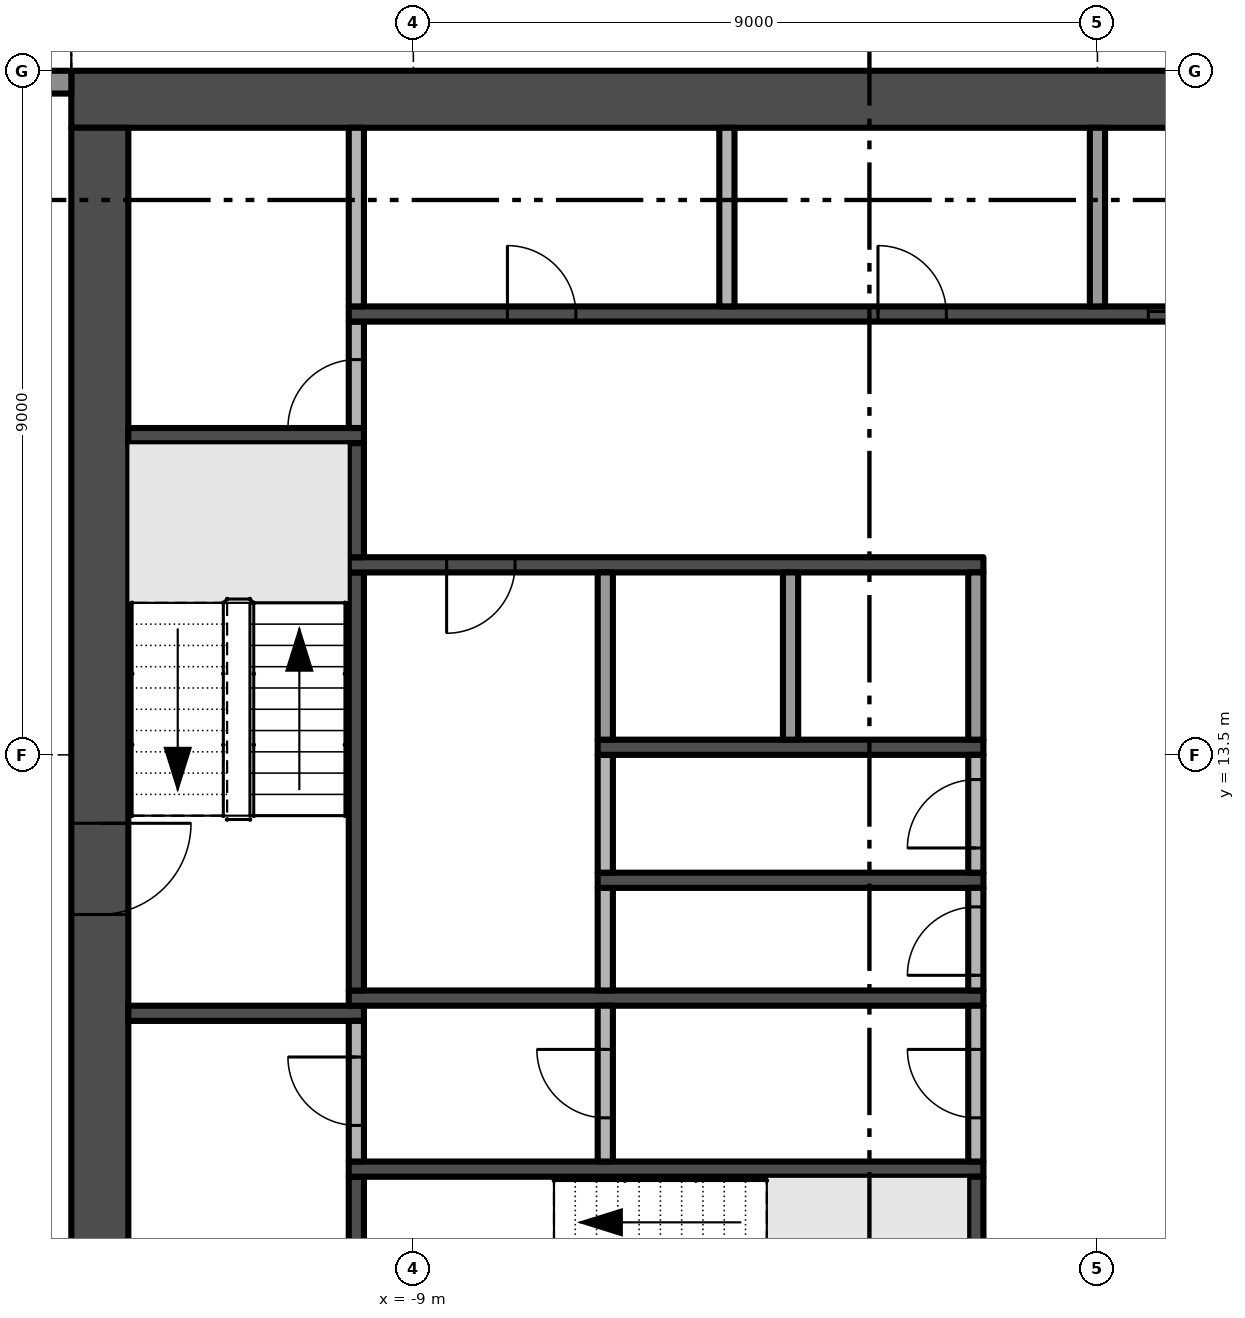
"""IFC4 building model, lengths in metres.
Left out: names, types, materials, properties, quantities, classifications, styles, units other than length and angle.
Written with IfcOpenShell. Run it as: python <this file> out.ifc"""

import sys

from ifc_helpers import new_model, si_unit, direction, frame, frame_2d, origin, place, context, subcontext, project, spatial, rectangle, extrude, element, fill, save


model = new_model("IFC4")
c1 = context("Model", 3, precision=1e-05, world=origin(), true_north=direction((0.0, 1.0)))
c2 = subcontext(c1, "Body", "Model", "MODEL_VIEW")
j1 = project(units=[si_unit("LENGTHUNIT", "METRE"), si_unit("PLANEANGLEUNIT", "RADIAN")], contexts=[c1])
p1 = place(None, origin())
s1 = spatial("IfcSite", under=j1, at=p1, CompositionType="ELEMENT")
p2 = place(p1, origin())
s2 = spatial("IfcBuilding", under=s1, at=p2, CompositionType="ELEMENT")
p3 = place(p2, frame((0.0, 0.0, 170.6)))
s3 = spatial("IfcBuildingStorey", under=s2, at=p3, CompositionType="ELEMENT", Elevation=170.6)
p4 = place(p3, frame((13.5, 22.125, -0.3), z_axis=(0.0, 0.0, 1.0), x_axis=(-1.0, 0.0, 0.0)))
e1 = element("IfcWall", 1, at=p4, inside=s3, PredefinedType="SHEAR", context=c2, shape_type="SweptSolid", body=[
    extrude(rectangle(XDim=27.0, YDim=0.75, at=frame_2d((13.5, 0.0))), origin(), (0.0, 0.0, 1.0), 3.8),
])
p5 = place(p3, frame((-13.125, 21.75, -0.3), z_axis=(0.0, 0.0, 1.0), x_axis=(0.0, -1.0, 0.0)))
e2 = element("IfcWall", 2, at=p5, inside=s3, PredefinedType="SHEAR", context=c2, shape_type="SweptSolid", body=[
    extrude(rectangle(XDim=16.5, YDim=0.75, at=frame_2d((8.25, 0.0))), origin(), (0.0, 0.0, 1.0), 3.8),
])
p6 = place(p5, frame((9.15, 0.0, 0.3)))
e3 = element("IfcOpeningElement", 3, at=p6, cuts=e2, PredefinedType="OPENING", context=c2, shape_type="SweptSolid", body=[
    extrude(rectangle(XDim=1.2, YDim=2.2, at=frame_2d((0.6, 1.1))), frame((0.0, 0.385, 0.0), z_axis=(0.0, -1.0, 0.0), x_axis=(1.0, 0.0, 0.0)), (0.0, 0.0, 1.0), 0.77),
])
p7 = place(p3, frame((-16.9, 22.35, 0.0), z_axis=(0.0, 0.0, 1.0), x_axis=(1.0, 0.0, 0.0)))
e4 = element("IfcWall", 4, at=p7, inside=s3, PredefinedType="SOLIDWALL", context=c2, shape_type="SweptSolid", body=[
    extrude(rectangle(XDim=3.4, YDim=0.3, at=frame_2d((1.7, 0.0))), origin(), (0.0, 0.0, 1.0), 3.5),
])
p8 = place(p7, frame((0.3, 0.0, 0.0)))
e5 = element("IfcOpeningElement", 5, at=p8, cuts=e4, PredefinedType="OPENING", context=c2, shape_type="SweptSolid", body=[
    extrude(rectangle(XDim=2.4, YDim=2.4, at=frame_2d((1.2, 1.2))), frame((0.0, 0.16, 0.0), z_axis=(0.0, -1.0, 0.0), x_axis=(1.0, 0.0, 0.0)), (0.0, 0.0, 1.0), 0.32),
])
for number, where, z_axis, x_axis in (
    (6, (-12.75, 10.1, 0.0), (0.0, 0.0, 1.0), (1.0, 0.0, 0.0)),
    (7, (-12.75, 17.7, 0.0), (0.0, 0.0, 1.0), (1.0, 0.0, 0.0)),
):
    element("IfcWall", number, at=place(p3, frame(where, z_axis=z_axis, x_axis=x_axis)), inside=s3, PredefinedType="SHEAR", context=c2, shape_type="SweptSolid", body=[
        extrude(rectangle(XDim=3.1, YDim=0.2, at=frame_2d((1.55, 0.0))), origin(), (0.0, 0.0, 1.0), 3.5),
    ])
p9 = place(p3, frame((-9.75, 5.25, 0.0), z_axis=(0.0, 0.0, 1.0), x_axis=(0.0, 1.0, 0.0)))
e8 = element("IfcWall", 8, at=p9, inside=s3, PredefinedType="SHEAR", context=c2, shape_type="SweptSolid", body=[
    extrude(rectangle(XDim=2.7, YDim=0.2, at=frame_2d((1.35, 0.0))), origin(), (0.0, 0.0, 1.0), 3.5),
])
p10 = place(p3, frame((-9.85, 8.05, 0.0), z_axis=(0.0, 0.0, 1.0), x_axis=(1.0, 0.0, 0.0)))
e9 = element("IfcWall", 9, at=p10, inside=s3, PredefinedType="SHEAR", context=c2, shape_type="SweptSolid", body=[
    extrude(rectangle(XDim=8.35, YDim=0.2, at=frame_2d((4.175, 0.0))), origin(), (0.0, 0.0, 1.0), 3.5),
])
p11 = place(p3, frame((-9.75, 8.15, 0.0), z_axis=(0.0, 0.0, 1.0), x_axis=(0.0, 1.0, 0.0)))
e10 = element("IfcWall", 10, at=p11, inside=s3, PredefinedType="PARTITIONING", context=c2, shape_type="SweptSolid", body=[
    extrude(rectangle(XDim=1.85, YDim=0.2, at=frame_2d((0.925, 0.0))), origin(), (0.0, 0.0, 1.0), 3.5),
])
p12 = place(p11, frame((0.475, 0.0, 0.0)))
e11 = element("IfcOpeningElement", 11, at=p12, cuts=e10, PredefinedType="OPENING", context=c2, shape_type="SweptSolid", body=[
    extrude(rectangle(XDim=0.9, YDim=2.1, at=frame_2d((0.45, 1.05))), frame((0.0, 0.11, 0.0), z_axis=(0.0, -1.0, 0.0), x_axis=(1.0, 0.0, 0.0)), (0.0, 0.0, 1.0), 0.22),
])
p13 = place(p3, frame((-9.85, 10.3, 0.0), z_axis=(0.0, 0.0, 1.0), x_axis=(1.0, 0.0, 0.0)))
e12 = element("IfcWall", 12, at=p13, inside=s3, PredefinedType="SHEAR", context=c2, shape_type="SweptSolid", body=[
    extrude(rectangle(XDim=8.35, YDim=0.2, at=frame_2d((4.175, 0.0))), origin(), (0.0, 0.0, 1.0), 3.5),
])
p14 = place(p3, frame((-9.75, 10.4, 0.0), z_axis=(0.0, 0.0, 1.0), x_axis=(0.0, 1.0, 0.0)))
e13 = element("IfcWall", 13, at=p14, inside=s3, PredefinedType="SHEAR", context=c2, shape_type="SweptSolid", body=[
    extrude(rectangle(XDim=5.5, YDim=0.2, at=frame_2d((2.75, 0.0))), origin(), (0.0, 0.0, 1.0), 3.5),
])
p15 = place(p3, frame((-1.5, 16.0, 0.0), z_axis=(0.0, 0.0, 1.0), x_axis=(-1.0, 0.0, 0.0)))
e14 = element("IfcWall", 14, at=p15, inside=s3, PredefinedType="SHEAR", context=c2, shape_type="SweptSolid", body=[
    extrude(rectangle(XDim=8.35, YDim=0.2, at=frame_2d((4.175, 0.0))), origin(), (0.0, 0.0, 1.0), 3.5),
])
p16 = place(p15, frame((6.162, 0.0, 0.0)))
e15 = element("IfcOpeningElement", 15, at=p16, cuts=e14, PredefinedType="OPENING", context=c2, shape_type="SweptSolid", body=[
    extrude(rectangle(XDim=0.9, YDim=2.1, at=frame_2d((0.45, 1.05))), frame((0.0, 0.11, 0.0), z_axis=(0.0, -1.0, 0.0), x_axis=(1.0, 0.0, 0.0)), (0.0, 0.0, 1.0), 0.22),
])
p17 = place(p3, frame((-9.75, 16.1, 0.0), z_axis=(0.0, 0.0, 1.0), x_axis=(0.0, 1.0, 0.0)))
e16 = element("IfcWall", 16, at=p17, inside=s3, PredefinedType="SHEAR", context=c2, shape_type="SweptSolid", body=[
    extrude(rectangle(XDim=1.5, YDim=0.2, at=frame_2d((0.75, 0.0))), origin(), (0.0, 0.0, 1.0), 3.5),
])
p18 = place(p3, frame((-9.75, 17.8, 0.0), z_axis=(0.0, 0.0, 1.0), x_axis=(0.0, 1.0, 0.0)))
e17 = element("IfcWall", 17, at=p18, inside=s3, PredefinedType="PARTITIONING", context=c2, shape_type="SweptSolid", body=[
    extrude(rectangle(XDim=1.4, YDim=0.2, at=frame_2d((0.7, 0.0))), origin(), (0.0, 0.0, 1.0), 3.5),
])
p19 = place(p18, origin())
e18 = element("IfcOpeningElement", 18, at=p19, cuts=e17, PredefinedType="OPENING", context=c2, shape_type="SweptSolid", body=[
    extrude(rectangle(XDim=0.9, YDim=2.1, at=frame_2d((0.45, 1.05))), frame((0.0, 0.11, 0.0), z_axis=(0.0, -1.0, 0.0), x_axis=(1.0, 0.0, 0.0)), (0.0, 0.0, 1.0), 0.22),
])
p20 = place(p3, frame((-9.85, 19.3, 0.0), z_axis=(0.0, 0.0, 1.0), x_axis=(1.0, 0.0, 0.0)))
e19 = element("IfcWall", 19, at=p20, inside=s3, PredefinedType="SHEAR", context=c2, shape_type="SweptSolid", body=[
    extrude(rectangle(XDim=19.7, YDim=0.2, at=frame_2d((9.85, 0.0))), origin(), (0.0, 0.0, 1.0), 3.5),
])
p21 = place(p20, frame((10.519, 0.0, 0.0)))
e20 = element("IfcOpeningElement", 20, at=p21, cuts=e19, PredefinedType="OPENING", context=c2, shape_type="SweptSolid", body=[
    extrude(rectangle(XDim=1.1, YDim=2.1, at=frame_2d((0.55, 1.05))), frame((0.0, 0.11, 0.0), z_axis=(0.0, -1.0, 0.0), x_axis=(1.0, 0.0, 0.0)), (0.0, 0.0, 1.0), 0.22),
])
p22 = place(p20, frame((12.956, 0.0, 0.0)))
e21 = element("IfcOpeningElement", 21, at=p22, cuts=e19, PredefinedType="OPENING", context=c2, shape_type="SweptSolid", body=[
    extrude(rectangle(XDim=1.1, YDim=2.1, at=frame_2d((0.55, 1.05))), frame((0.0, 0.11, 0.0), z_axis=(0.0, -1.0, 0.0), x_axis=(1.0, 0.0, 0.0)), (0.0, 0.0, 1.0), 0.22),
])
p23 = place(p20, frame((15.394, 0.0, 0.0)))
e22 = element("IfcOpeningElement", 22, at=p23, cuts=e19, PredefinedType="OPENING", context=c2, shape_type="SweptSolid", body=[
    extrude(rectangle(XDim=1.1, YDim=2.1, at=frame_2d((0.55, 1.05))), frame((0.0, 0.11, 0.0), z_axis=(0.0, -1.0, 0.0), x_axis=(1.0, 0.0, 0.0)), (0.0, 0.0, 1.0), 0.22),
])
p24 = place(p20, frame((17.831, 0.0, 0.0)))
e23 = element("IfcOpeningElement", 23, at=p24, cuts=e19, PredefinedType="OPENING", context=c2, shape_type="SweptSolid", body=[
    extrude(rectangle(XDim=1.1, YDim=2.1, at=frame_2d((0.55, 1.05))), frame((0.0, 0.11, 0.0), z_axis=(0.0, -1.0, 0.0), x_axis=(1.0, 0.0, 0.0)), (0.0, 0.0, 1.0), 0.22),
])
p25 = place(p20, frame((2.087, 0.0, 0.0)))
e24 = element("IfcOpeningElement", 24, at=p25, cuts=e19, PredefinedType="OPENING", context=c2, shape_type="SweptSolid", body=[
    extrude(rectangle(XDim=0.9, YDim=2.1, at=frame_2d((0.45, 1.05))), frame((0.0, 0.11, 0.0), z_axis=(0.0, -1.0, 0.0), x_axis=(1.0, 0.0, 0.0)), (0.0, 0.0, 1.0), 0.22),
])
p26 = place(p20, frame((6.963, 0.0, 0.0)))
e25 = element("IfcOpeningElement", 25, at=p26, cuts=e19, PredefinedType="OPENING", context=c2, shape_type="SweptSolid", body=[
    extrude(rectangle(XDim=0.9, YDim=2.1, at=frame_2d((0.45, 1.05))), frame((0.0, 0.11, 0.0), z_axis=(0.0, -1.0, 0.0), x_axis=(1.0, 0.0, 0.0)), (0.0, 0.0, 1.0), 0.22),
])
p27 = place(p3, frame((-9.75, 19.4, 0.0), z_axis=(0.0, 0.0, 1.0), x_axis=(0.0, 1.0, 0.0)))
e26 = element("IfcWall", 26, at=p27, inside=s3, PredefinedType="PARTITIONING", context=c2, shape_type="SweptSolid", body=[
    extrude(rectangle(XDim=2.35, YDim=0.2, at=frame_2d((1.175, 0.0))), origin(), (0.0, 0.0, 1.0), 3.5),
])
p28 = place(p3, frame((-6.475, 8.15, 0.0), z_axis=(0.0, 0.0, 1.0), x_axis=(0.0, 1.0, 0.0)))
e27 = element("IfcWall", 27, at=p28, inside=s3, PredefinedType="PARTITIONING", context=c2, shape_type="SweptSolid", body=[
    extrude(rectangle(XDim=2.05, YDim=0.2, at=frame_2d((1.025, 0.0))), origin(), (0.0, 0.0, 1.0), 3.5),
])
p29 = place(p28, frame((0.575, 0.0, 0.0)))
e28 = element("IfcOpeningElement", 28, at=p29, cuts=e27, PredefinedType="OPENING", context=c2, shape_type="SweptSolid", body=[
    extrude(rectangle(XDim=0.9, YDim=2.1, at=frame_2d((0.45, 1.05))), frame((0.0, 0.11, 0.0), z_axis=(0.0, -1.0, 0.0), x_axis=(1.0, 0.0, 0.0)), (0.0, 0.0, 1.0), 0.22),
])
p30 = place(p3, frame((-6.475, 10.4, 0.0), z_axis=(0.0, 0.0, 1.0), x_axis=(0.0, 1.0, 0.0)))
e29 = element("IfcWall", 29, at=p30, inside=s3, PredefinedType="PARTITIONING", context=c2, shape_type="SweptSolid", body=[
    extrude(rectangle(XDim=1.35, YDim=0.2, at=frame_2d((0.675, 0.0))), origin(), (0.0, 0.0, 1.0), 3.5),
])
p31 = place(p3, frame((-6.575, 11.85, 0.0), z_axis=(0.0, 0.0, 1.0), x_axis=(1.0, 0.0, 0.0)))
e30 = element("IfcWall", 30, at=p31, inside=s3, PredefinedType="SHEAR", context=c2, shape_type="SweptSolid", body=[
    extrude(rectangle(XDim=5.075, YDim=0.2, at=frame_2d((2.538, 0.0))), origin(), (0.0, 0.0, 1.0), 3.5),
])
p32 = place(p3, frame((-6.475, 11.95, 0.0), z_axis=(0.0, 0.0, 1.0), x_axis=(0.0, 1.0, 0.0)))
e31 = element("IfcWall", 31, at=p32, inside=s3, PredefinedType="PARTITIONING", context=c2, shape_type="SweptSolid", body=[
    extrude(rectangle(XDim=1.55, YDim=0.2, at=frame_2d((0.775, 0.0))), origin(), (0.0, 0.0, 1.0), 3.5),
])
p33 = place(p3, frame((-6.575, 13.6, 0.0), z_axis=(0.0, 0.0, 1.0), x_axis=(1.0, 0.0, 0.0)))
e32 = element("IfcWall", 32, at=p33, inside=s3, PredefinedType="SHEAR", context=c2, shape_type="SweptSolid", body=[
    extrude(rectangle(XDim=5.075, YDim=0.2, at=frame_2d((2.538, 0.0))), origin(), (0.0, 0.0, 1.0), 3.5),
])
p34 = place(p3, frame((-6.475, 13.7, 0.0), z_axis=(0.0, 0.0, 1.0), x_axis=(0.0, 1.0, 0.0)))
e33 = element("IfcWall", 33, at=p34, inside=s3, PredefinedType="PARTITIONING", context=c2, shape_type="SweptSolid", body=[
    extrude(rectangle(XDim=2.2, YDim=0.2, at=frame_2d((1.1, 0.0))), origin(), (0.0, 0.0, 1.0), 3.5),
])
p35 = place(p3, frame((-4.875, 19.4, 0.0), z_axis=(0.0, 0.0, 1.0), x_axis=(0.0, 1.0, 0.0)))
e34 = element("IfcWall", 34, at=p35, inside=s3, PredefinedType="PARTITIONING", context=c2, shape_type="SweptSolid", body=[
    extrude(rectangle(XDim=2.35, YDim=0.2, at=frame_2d((1.175, 0.0))), origin(), (0.0, 0.0, 1.0), 3.5),
])
p36 = place(p3, frame((-4.037, 13.7, 0.0), z_axis=(0.0, 0.0, 1.0), x_axis=(0.0, 1.0, 0.0)))
e35 = element("IfcWall", 35, at=p36, inside=s3, PredefinedType="PARTITIONING", context=c2, shape_type="SweptSolid", body=[
    extrude(rectangle(XDim=2.2, YDim=0.2, at=frame_2d((1.1, 0.0))), origin(), (0.0, 0.0, 1.0), 3.5),
])
p37 = place(p3, frame((-1.6, 5.25, 0.0), z_axis=(0.0, 0.0, 1.0), x_axis=(0.0, 1.0, 0.0)))
e36 = element("IfcWall", 36, at=p37, inside=s3, PredefinedType="SHEAR", context=c2, shape_type="SweptSolid", body=[
    extrude(rectangle(XDim=2.7, YDim=0.2, at=frame_2d((1.35, 0.0))), origin(), (0.0, 0.0, 1.0), 3.5),
])
p38 = place(p3, frame((-1.6, 8.15, 0.0), z_axis=(0.0, 0.0, 1.0), x_axis=(0.0, 1.0, 0.0)))
e37 = element("IfcWall", 37, at=p38, inside=s3, PredefinedType="PARTITIONING", context=c2, shape_type="SweptSolid", body=[
    extrude(rectangle(XDim=2.05, YDim=0.2, at=frame_2d((1.025, 0.0))), origin(), (0.0, 0.0, 1.0), 3.5),
])
p39 = place(p38, frame((0.575, 0.0, 0.0)))
e38 = element("IfcOpeningElement", 38, at=p39, cuts=e37, PredefinedType="OPENING", context=c2, shape_type="SweptSolid", body=[
    extrude(rectangle(XDim=0.9, YDim=2.1, at=frame_2d((0.45, 1.05))), frame((0.0, 0.11, 0.0), z_axis=(0.0, -1.0, 0.0), x_axis=(1.0, 0.0, 0.0)), (0.0, 0.0, 1.0), 0.22),
])
p40 = place(p3, frame((-1.6, 10.4, 0.0), z_axis=(0.0, 0.0, 1.0), x_axis=(0.0, 1.0, 0.0)))
e39 = element("IfcWall", 39, at=p40, inside=s3, PredefinedType="PARTITIONING", context=c2, shape_type="SweptSolid", body=[
    extrude(rectangle(XDim=1.35, YDim=0.2, at=frame_2d((0.675, 0.0))), origin(), (0.0, 0.0, 1.0), 3.5),
])
p41 = place(p40, frame((0.2, 0.0, 0.0)))
e40 = element("IfcOpeningElement", 40, at=p41, cuts=e39, PredefinedType="OPENING", context=c2, shape_type="SweptSolid", body=[
    extrude(rectangle(XDim=0.9, YDim=2.1, at=frame_2d((0.45, 1.05))), frame((0.0, 0.11, 0.0), z_axis=(0.0, -1.0, 0.0), x_axis=(1.0, 0.0, 0.0)), (0.0, 0.0, 1.0), 0.22),
])
p42 = place(p3, frame((-1.6, 11.95, 0.0), z_axis=(0.0, 0.0, 1.0), x_axis=(0.0, 1.0, 0.0)))
e41 = element("IfcWall", 41, at=p42, inside=s3, PredefinedType="PARTITIONING", context=c2, shape_type="SweptSolid", body=[
    extrude(rectangle(XDim=1.55, YDim=0.2, at=frame_2d((0.775, 0.0))), origin(), (0.0, 0.0, 1.0), 3.5),
])
p43 = place(p42, frame((0.325, 0.0, 0.0)))
e42 = element("IfcOpeningElement", 42, at=p43, cuts=e41, PredefinedType="OPENING", context=c2, shape_type="SweptSolid", body=[
    extrude(rectangle(XDim=0.9, YDim=2.1, at=frame_2d((0.45, 1.05))), frame((0.0, 0.11, 0.0), z_axis=(0.0, -1.0, 0.0), x_axis=(1.0, 0.0, 0.0)), (0.0, 0.0, 1.0), 0.22),
])
p44 = place(p3, frame((-1.6, 13.7, 0.0), z_axis=(0.0, 0.0, 1.0), x_axis=(0.0, 1.0, 0.0)))
e43 = element("IfcWall", 43, at=p44, inside=s3, PredefinedType="PARTITIONING", context=c2, shape_type="SweptSolid", body=[
    extrude(rectangle(XDim=2.2, YDim=0.2, at=frame_2d((1.1, 0.0))), origin(), (0.0, 0.0, 1.0), 3.5),
])
p45 = place(p3, frame((0.0, 19.4, 0.0), z_axis=(0.0, 0.0, 1.0), x_axis=(0.0, 1.0, 0.0)))
e44 = element("IfcWall", 44, at=p45, inside=s3, PredefinedType="PARTITIONING", context=c2, shape_type="SweptSolid", body=[
    extrude(rectangle(XDim=2.35, YDim=0.2, at=frame_2d((1.175, 0.0))), origin(), (0.0, 0.0, 1.0), 3.5),
])
p46 = place(p6, frame((1.2, 0.0, 0.0), z_axis=(0.0, 0.0, 1.0), x_axis=(-1.0, 0.0, 0.0)))
e45 = element("IfcDoor", 45, at=p46, inside=s3, OperationType="SINGLE_SWING_RIGHT", PredefinedType="DOOR", context=c2, shape_type="SweptSolid", body=[
    extrude(rectangle(XDim=1.2, YDim=2.2, at=frame_2d((0.6, 1.1))), frame((0.0, 0.025, 0.0), z_axis=(0.0, -1.0, 0.0), x_axis=(1.0, 0.0, 0.0)), (0.0, 0.0, 1.0), 0.05),
])
fill(e3, e45)
p47 = place(p21, origin())
e46 = element("IfcDoor", 46, at=p47, inside=s3, OperationType="SLIDING_TO_RIGHT", PredefinedType="DOOR", context=c2, shape_type="SweptSolid", body=[
    extrude(rectangle(XDim=1.1, YDim=2.1, at=frame_2d((0.55, 1.05))), frame((0.0, 0.025, 0.0), z_axis=(0.0, -1.0, 0.0), x_axis=(1.0, 0.0, 0.0)), (0.0, 0.0, 1.0), 0.05),
])
fill(e20, e46)
p48 = place(p16, origin())
e47 = element("IfcDoor", 47, at=p48, inside=s3, OperationType="SINGLE_SWING_RIGHT", PredefinedType="DOOR", context=c2, shape_type="SweptSolid", body=[
    extrude(rectangle(XDim=0.9, YDim=2.1, at=frame_2d((0.45, 1.05))), frame((0.0, 0.025, 0.0), z_axis=(0.0, -1.0, 0.0), x_axis=(1.0, 0.0, 0.0)), (0.0, 0.0, 1.0), 0.05),
])
fill(e15, e47)
p49 = place(p39, origin())
e48 = element("IfcDoor", 48, at=p49, inside=s3, OperationType="SINGLE_SWING_RIGHT", PredefinedType="DOOR", context=c2, shape_type="SweptSolid", body=[
    extrude(rectangle(XDim=0.9, YDim=2.1, at=frame_2d((0.45, 1.05))), frame((0.0, 0.025, 0.0), z_axis=(0.0, -1.0, 0.0), x_axis=(1.0, 0.0, 0.0)), (0.0, 0.0, 1.0), 0.05),
])
fill(e38, e48)
p50 = place(p41, origin())
e49 = element("IfcDoor", 49, at=p50, inside=s3, OperationType="SINGLE_SWING_LEFT", PredefinedType="DOOR", context=c2, shape_type="SweptSolid", body=[
    extrude(rectangle(XDim=0.9, YDim=2.1, at=frame_2d((0.45, 1.05))), frame((0.0, 0.025, 0.0), z_axis=(0.0, -1.0, 0.0), x_axis=(1.0, 0.0, 0.0)), (0.0, 0.0, 1.0), 0.05),
])
fill(e40, e49)
p51 = place(p43, origin())
e50 = element("IfcDoor", 50, at=p51, inside=s3, OperationType="SINGLE_SWING_LEFT", PredefinedType="DOOR", context=c2, shape_type="SweptSolid", body=[
    extrude(rectangle(XDim=0.9, YDim=2.1, at=frame_2d((0.45, 1.05))), frame((0.0, 0.025, 0.0), z_axis=(0.0, -1.0, 0.0), x_axis=(1.0, 0.0, 0.0)), (0.0, 0.0, 1.0), 0.05),
])
fill(e42, e50)
p52 = place(p19, origin())
e51 = element("IfcDoor", 51, at=p52, inside=s3, OperationType="SINGLE_SWING_LEFT", PredefinedType="DOOR", context=c2, shape_type="SweptSolid", body=[
    extrude(rectangle(XDim=0.9, YDim=2.1, at=frame_2d((0.45, 1.05))), frame((0.0, 0.025, 0.0), z_axis=(0.0, -1.0, 0.0), x_axis=(1.0, 0.0, 0.0)), (0.0, 0.0, 1.0), 0.05),
])
fill(e18, e51)
p53 = place(p25, origin())
e52 = element("IfcDoor", 52, at=p53, inside=s3, OperationType="SINGLE_SWING_LEFT", PredefinedType="DOOR", context=c2, shape_type="SweptSolid", body=[
    extrude(rectangle(XDim=0.9, YDim=2.1, at=frame_2d((0.45, 1.05))), frame((0.0, 0.025, 0.0), z_axis=(0.0, -1.0, 0.0), x_axis=(1.0, 0.0, 0.0)), (0.0, 0.0, 1.0), 0.05),
])
fill(e24, e52)
p54 = place(p26, origin())
e53 = element("IfcDoor", 53, at=p54, inside=s3, OperationType="SINGLE_SWING_LEFT", PredefinedType="DOOR", context=c2, shape_type="SweptSolid", body=[
    extrude(rectangle(XDim=0.9, YDim=2.1, at=frame_2d((0.45, 1.05))), frame((0.0, 0.025, 0.0), z_axis=(0.0, -1.0, 0.0), x_axis=(1.0, 0.0, 0.0)), (0.0, 0.0, 1.0), 0.05),
])
fill(e25, e53)
p55 = place(p29, origin())
e54 = element("IfcDoor", 54, at=p55, inside=s3, OperationType="SINGLE_SWING_RIGHT", PredefinedType="DOOR", context=c2, shape_type="SweptSolid", body=[
    extrude(rectangle(XDim=0.9, YDim=2.1, at=frame_2d((0.45, 1.05))), frame((0.0, 0.025, 0.0), z_axis=(0.0, -1.0, 0.0), x_axis=(1.0, 0.0, 0.0)), (0.0, 0.0, 1.0), 0.05),
])
fill(e28, e54)
p56 = place(p12, origin())
e55 = element("IfcDoor", 55, at=p56, inside=s3, OperationType="SINGLE_SWING_RIGHT", PredefinedType="DOOR", context=c2, shape_type="SweptSolid", body=[
    extrude(rectangle(XDim=0.9, YDim=2.1, at=frame_2d((0.45, 1.05))), frame((0.0, 0.025, 0.0), z_axis=(0.0, -1.0, 0.0), x_axis=(1.0, 0.0, 0.0)), (0.0, 0.0, 1.0), 0.05),
])
fill(e11, e55)
save(model, sys.argv[1])
